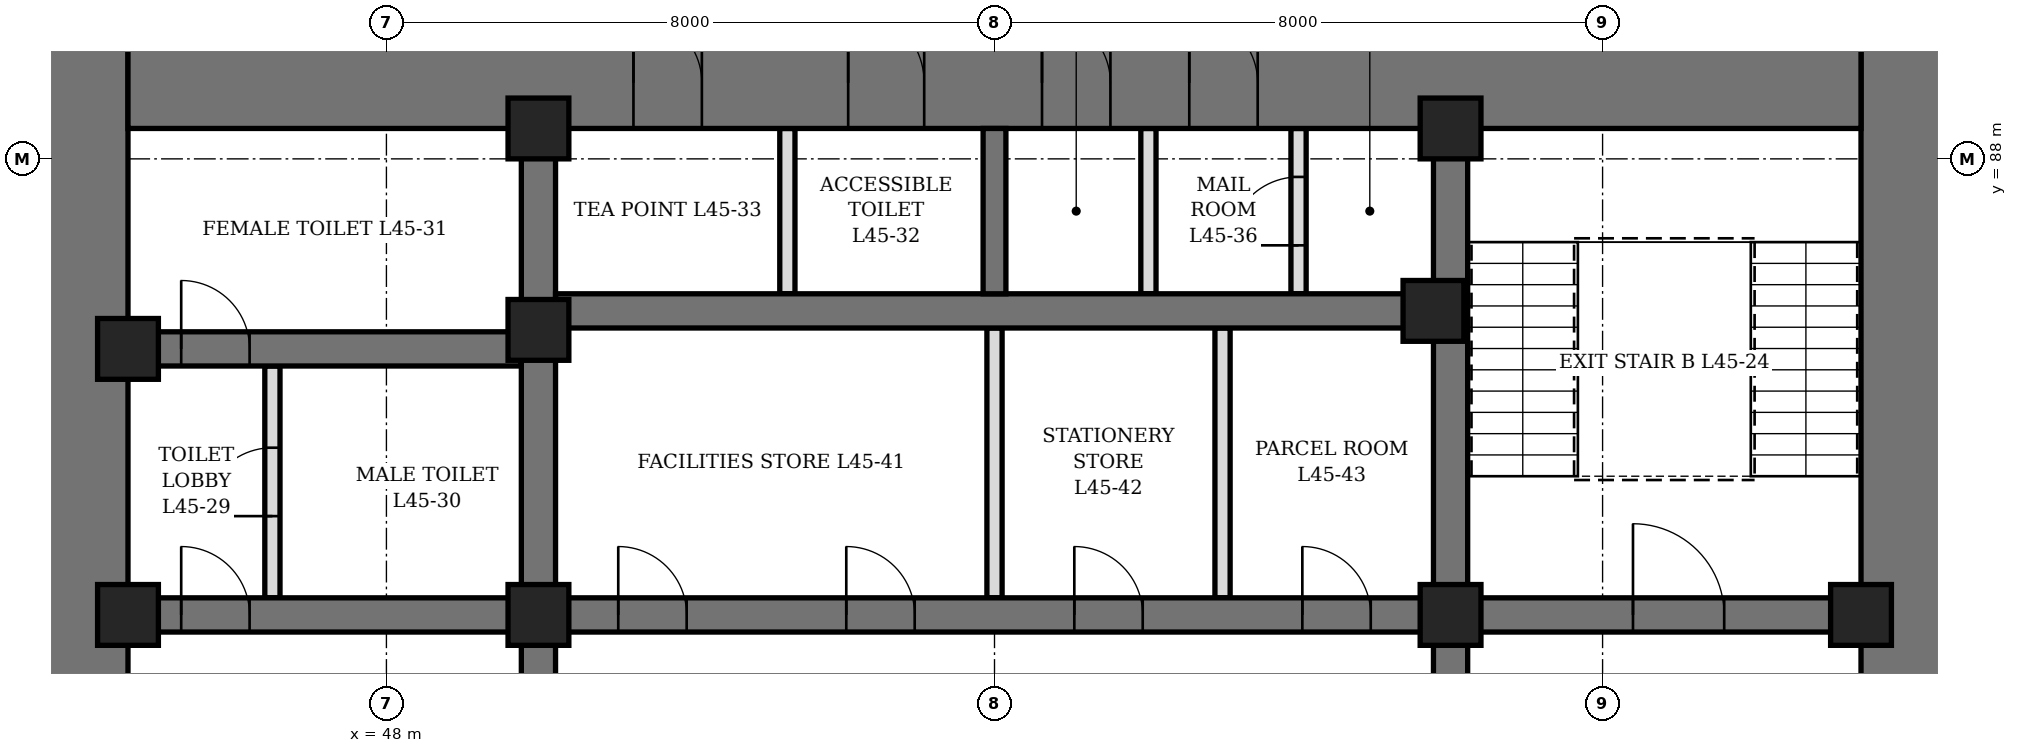
"""IFC4 building model, lengths in metres.
Left out: names, types, materials, properties, quantities, classifications, styles, units other than length and angle.
Written with IfcOpenShell. Run it as: python <this file> out.ifc"""

import sys

from ifc_helpers import new_model, si_unit, direction, frame, frame_2d, origin, origin_2d, place, context, subcontext, project, spatial, rectangle, hollow_rectangle, extrude, element, fill, save


model = new_model("IFC4")
c1 = context("Model", 3, precision=1e-05, world=origin(), true_north=direction((0.0, 1.0)))
c2 = subcontext(c1, "Body", "Model", "MODEL_VIEW")
j1 = project(units=[si_unit("LENGTHUNIT", "METRE"), si_unit("PLANEANGLEUNIT", "RADIAN")], contexts=[c1])
p1 = place(None, origin())
s1 = spatial("IfcSite", under=j1, at=p1, CompositionType="ELEMENT")
p2 = place(p1, origin())
s2 = spatial("IfcBuilding", under=s1, at=p2, CompositionType="ELEMENT")
p3 = place(p2, frame((0.0, 0.0, 202.3)))
s3 = spatial("IfcBuildingStorey", under=s2, at=p3, CompositionType="ELEMENT", Elevation=202.3)
p4 = place(p3, frame((44.0, 70.4, 0.0), z_axis=(0.0, 0.0, 1.0), x_axis=(0.0, 1.0, 0.0)))
e1 = element("IfcWall", 1, at=p4, inside=s3, PredefinedType="SHEAR", context=c2, shape_type="SweptSolid", body=[
    extrude(rectangle(XDim=19.2, YDim=1.2, at=frame_2d((9.6, 0.0))), origin(), (0.0, 0.0, 1.0), 4.2),
])
p5 = place(p4, frame((8.6, 0.0, 0.0)))
e2 = element("IfcOpeningElement", 2, at=p5, cuts=e1, PredefinedType="OPENING", context=c2, shape_type="SweptSolid", body=[
    extrude(rectangle(XDim=2.0, YDim=2.4, at=frame_2d((1.0, 1.2))), frame((0.0, 0.61, 0.0), z_axis=(0.0, -1.0, 0.0), x_axis=(1.0, 0.0, 0.0)), (0.0, 0.0, 1.0), 1.22),
])
p6 = place(p3, frame((68.0, 70.4, 0.0), z_axis=(0.0, 0.0, 1.0), x_axis=(0.0, 1.0, 0.0)))
e3 = element("IfcWall", 3, at=p6, inside=s3, PredefinedType="SHEAR", context=c2, shape_type="SweptSolid", body=[
    extrude(rectangle(XDim=19.2, YDim=1.2, at=frame_2d((9.6, 0.0))), origin(), (0.0, 0.0, 1.0), 4.2),
])
p7 = place(p6, frame((8.6, 0.0, 0.0)))
e4 = element("IfcOpeningElement", 4, at=p7, cuts=e3, PredefinedType="OPENING", context=c2, shape_type="SweptSolid", body=[
    extrude(rectangle(XDim=2.0, YDim=2.4, at=frame_2d((1.0, 1.2))), frame((0.0, 0.61, 0.0), z_axis=(0.0, -1.0, 0.0), x_axis=(1.0, 0.0, 0.0)), (0.0, 0.0, 1.0), 1.22),
])
p8 = place(p3, frame((44.6, 89.0, 0.0), z_axis=(0.0, 0.0, 1.0), x_axis=(1.0, 0.0, 0.0)))
e5 = element("IfcWall", 5, at=p8, inside=s3, PredefinedType="SHEAR", context=c2, shape_type="SweptSolid", body=[
    extrude(rectangle(XDim=22.8, YDim=1.2, at=frame_2d((11.4, 0.0))), origin(), (0.0, 0.0, 1.0), 4.2),
])
p9 = place(p8, frame((9.475, 0.0, 0.0)))
e6 = element("IfcOpeningElement", 6, at=p9, cuts=e5, PredefinedType="OPENING", context=c2, shape_type="SweptSolid", body=[
    extrude(rectangle(XDim=1.0, YDim=2.1, at=frame_2d((0.5, 1.05))), frame((0.0, 0.61, 0.0), z_axis=(0.0, -1.0, 0.0), x_axis=(1.0, 0.0, 0.0)), (0.0, 0.0, 1.0), 1.22),
])
p10 = place(p8, frame((6.65, 0.0, 0.0)))
e7 = element("IfcOpeningElement", 7, at=p10, cuts=e5, PredefinedType="OPENING", context=c2, shape_type="SweptSolid", body=[
    extrude(rectangle(XDim=0.9, YDim=2.1, at=frame_2d((0.45, 1.05))), frame((0.0, 0.61, 0.0), z_axis=(0.0, -1.0, 0.0), x_axis=(1.0, 0.0, 0.0)), (0.0, 0.0, 1.0), 1.22),
])
p11 = place(p8, frame((12.025, 0.0, 0.0)))
e8 = element("IfcOpeningElement", 8, at=p11, cuts=e5, PredefinedType="OPENING", context=c2, shape_type="SweptSolid", body=[
    extrude(rectangle(XDim=0.9, YDim=2.1, at=frame_2d((0.45, 1.05))), frame((0.0, 0.61, 0.0), z_axis=(0.0, -1.0, 0.0), x_axis=(1.0, 0.0, 0.0)), (0.0, 0.0, 1.0), 1.22),
])
p12 = place(p8, frame((13.962, 0.0, 0.0)))
e9 = element("IfcOpeningElement", 9, at=p12, cuts=e5, PredefinedType="OPENING", context=c2, shape_type="SweptSolid", body=[
    extrude(rectangle(XDim=0.9, YDim=2.1, at=frame_2d((0.45, 1.05))), frame((0.0, 0.61, 0.0), z_axis=(0.0, -1.0, 0.0), x_axis=(1.0, 0.0, 0.0)), (0.0, 0.0, 1.0), 1.22),
])
p13 = place(p3, frame((50.0, 71.6, 0.0), z_axis=(0.0, 0.0, 1.0), x_axis=(0.0, 1.0, 0.0)))
e10 = element("IfcWall", 10, at=p13, inside=s3, PredefinedType="SHEAR", context=c2, shape_type="SweptSolid", body=[
    extrude(rectangle(XDim=16.8, YDim=0.45, at=frame_2d((8.4, 0.0))), origin(), (0.0, 0.0, 1.0), 4.2),
])
p14 = place(p13, frame((7.5, 0.0, 0.0)))
e11 = element("IfcOpeningElement", 11, at=p14, cuts=e10, PredefinedType="OPENING", context=c2, shape_type="SweptSolid", body=[
    extrude(rectangle(XDim=1.8, YDim=2.4, at=frame_2d((0.9, 1.2))), frame((0.0, 0.235, 0.0), z_axis=(0.0, -1.0, 0.0), x_axis=(1.0, 0.0, 0.0)), (0.0, 0.0, 1.0), 0.47),
])
p15 = place(p3, frame((62.0, 71.6, 0.0), z_axis=(0.0, 0.0, 1.0), x_axis=(0.0, 1.0, 0.0)))
e12 = element("IfcWall", 12, at=p15, inside=s3, PredefinedType="SHEAR", context=c2, shape_type="SweptSolid", body=[
    extrude(rectangle(XDim=16.8, YDim=0.45, at=frame_2d((8.4, 0.0))), origin(), (0.0, 0.0, 1.0), 4.2),
])
p16 = place(p15, frame((7.5, 0.0, 0.0)))
e13 = element("IfcOpeningElement", 13, at=p16, cuts=e12, PredefinedType="OPENING", context=c2, shape_type="SweptSolid", body=[
    extrude(rectangle(XDim=1.8, YDim=2.4, at=frame_2d((0.9, 1.2))), frame((0.0, 0.235, 0.0), z_axis=(0.0, -1.0, 0.0), x_axis=(1.0, 0.0, 0.0)), (0.0, 0.0, 1.0), 0.47),
])
p17 = place(p3, frame((44.6, 82.0, 0.0), z_axis=(0.0, 0.0, 1.0), x_axis=(1.0, 0.0, 0.0)))
e14 = element("IfcWall", 14, at=p17, inside=s3, PredefinedType="SHEAR", context=c2, shape_type="SweptSolid", body=[
    extrude(rectangle(XDim=5.175, YDim=0.45, at=frame_2d((2.587, 0.0))), origin(), (0.0, 0.0, 1.0), 4.2),
])
p18 = place(p17, frame((0.7, 0.0, 0.0)))
e15 = element("IfcOpeningElement", 15, at=p18, cuts=e14, PredefinedType="OPENING", context=c2, shape_type="SweptSolid", body=[
    extrude(rectangle(XDim=0.9, YDim=2.1, at=frame_2d((0.45, 1.05))), frame((0.0, 0.235, 0.0), z_axis=(0.0, -1.0, 0.0), x_axis=(1.0, 0.0, 0.0)), (0.0, 0.0, 1.0), 0.47),
])
p19 = place(p3, frame((44.6, 85.5, 0.0), z_axis=(0.0, 0.0, 1.0), x_axis=(1.0, 0.0, 0.0)))
e16 = element("IfcWall", 16, at=p19, inside=s3, PredefinedType="SHEAR", context=c2, shape_type="SweptSolid", body=[
    extrude(rectangle(XDim=5.175, YDim=0.45, at=frame_2d((2.587, 0.0))), origin(), (0.0, 0.0, 1.0), 4.2),
])
p20 = place(p19, frame((0.7, 0.0, 0.0)))
e17 = element("IfcOpeningElement", 17, at=p20, cuts=e16, PredefinedType="OPENING", context=c2, shape_type="SweptSolid", body=[
    extrude(rectangle(XDim=0.9, YDim=2.1, at=frame_2d((0.45, 1.05))), frame((0.0, 0.235, 0.0), z_axis=(0.0, -1.0, 0.0), x_axis=(1.0, 0.0, 0.0)), (0.0, 0.0, 1.0), 0.47),
])
p21 = place(p3, frame((62.225, 82.0, 0.0), z_axis=(0.0, 0.0, 1.0), x_axis=(1.0, 0.0, 0.0)))
e18 = element("IfcWall", 18, at=p21, inside=s3, PredefinedType="SHEAR", context=c2, shape_type="SweptSolid", body=[
    extrude(rectangle(XDim=5.175, YDim=0.45, at=frame_2d((2.587, 0.0))), origin(), (0.0, 0.0, 1.0), 4.2),
])
p22 = place(p21, frame((2.175, 0.0, 0.0)))
e19 = element("IfcOpeningElement", 19, at=p22, cuts=e18, PredefinedType="OPENING", context=c2, shape_type="SweptSolid", body=[
    extrude(rectangle(XDim=1.2, YDim=2.1, at=frame_2d((0.6, 1.05))), frame((0.0, 0.235, 0.0), z_axis=(0.0, -1.0, 0.0), x_axis=(1.0, 0.0, 0.0)), (0.0, 0.0, 1.0), 0.47),
])
p23 = place(p3, frame((50.225, 82.0, 0.0), z_axis=(0.0, 0.0, 1.0), x_axis=(1.0, 0.0, 0.0)))
e20 = element("IfcWall", 20, at=p23, inside=s3, PredefinedType="SHEAR", context=c2, shape_type="SweptSolid", body=[
    extrude(rectangle(XDim=11.55, YDim=0.45, at=frame_2d((5.775, 0.0))), origin(), (0.0, 0.0, 1.0), 4.2),
])
p24 = place(p23, frame((0.825, 0.0, 0.0)))
e21 = element("IfcOpeningElement", 21, at=p24, cuts=e20, PredefinedType="OPENING", context=c2, shape_type="SweptSolid", body=[
    extrude(rectangle(XDim=0.9, YDim=2.1, at=frame_2d((0.45, 1.05))), frame((0.0, 0.235, 0.0), z_axis=(0.0, -1.0, 0.0), x_axis=(1.0, 0.0, 0.0)), (0.0, 0.0, 1.0), 0.47),
])
p25 = place(p23, frame((3.825, 0.0, 0.0)))
e22 = element("IfcOpeningElement", 22, at=p25, cuts=e20, PredefinedType="OPENING", context=c2, shape_type="SweptSolid", body=[
    extrude(rectangle(XDim=0.9, YDim=2.1, at=frame_2d((0.45, 1.05))), frame((0.0, 0.235, 0.0), z_axis=(0.0, -1.0, 0.0), x_axis=(1.0, 0.0, 0.0)), (0.0, 0.0, 1.0), 0.47),
])
p26 = place(p23, frame((6.825, 0.0, 0.0)))
e23 = element("IfcOpeningElement", 23, at=p26, cuts=e20, PredefinedType="OPENING", context=c2, shape_type="SweptSolid", body=[
    extrude(rectangle(XDim=0.9, YDim=2.1, at=frame_2d((0.45, 1.05))), frame((0.0, 0.235, 0.0), z_axis=(0.0, -1.0, 0.0), x_axis=(1.0, 0.0, 0.0)), (0.0, 0.0, 1.0), 0.47),
])
p27 = place(p23, frame((9.825, 0.0, 0.0)))
e24 = element("IfcOpeningElement", 24, at=p27, cuts=e20, PredefinedType="OPENING", context=c2, shape_type="SweptSolid", body=[
    extrude(rectangle(XDim=0.9, YDim=2.1, at=frame_2d((0.45, 1.05))), frame((0.0, 0.235, 0.0), z_axis=(0.0, -1.0, 0.0), x_axis=(1.0, 0.0, 0.0)), (0.0, 0.0, 1.0), 0.47),
])
p28 = place(p3, frame((50.225, 86.0, 0.0), z_axis=(0.0, 0.0, 1.0), x_axis=(1.0, 0.0, 0.0)))
e25 = element("IfcWall", 25, at=p28, inside=s3, PredefinedType="SHEAR", context=c2, shape_type="SweptSolid", body=[
    extrude(rectangle(XDim=11.55, YDim=0.45, at=frame_2d((5.775, 0.0))), origin(), (0.0, 0.0, 1.0), 4.2),
])
p29 = place(p3, frame((56.0, 86.225, 0.0), z_axis=(0.0, 0.0, 1.0), x_axis=(0.0, 1.0, 0.0)))
e26 = element("IfcWall", 26, at=p29, inside=s3, PredefinedType="SHEAR", context=c2, shape_type="SweptSolid", body=[
    extrude(rectangle(XDim=2.175, YDim=0.3, at=frame_2d((1.087, 0.0))), origin(), (0.0, 0.0, 1.0), 4.2),
])
for number, where, z_axis, x_axis in (
    (27, (44.6, 82.0, 0.0), (0.0, 0.0, 1.0), (1.0, 0.0, 0.0)),
    (28, (44.6, 85.5, 0.0), (0.0, 0.0, 1.0), (1.0, 0.0, 0.0)),
    (29, (50.0, 82.0, 0.0), (0.0, 0.0, 1.0), (1.0, 0.0, 0.0)),
    (30, (50.0, 85.75, 0.0), (0.0, 0.0, 1.0), (1.0, 0.0, 0.0)),
    (31, (50.0, 88.4, 0.0), (0.0, 0.0, 1.0), (1.0, 0.0, 0.0)),
    (32, (61.775, 86.0, 0.0), (0.0, 0.0, 1.0), (1.0, 0.0, 0.0)),
    (33, (62.0, 82.0, 0.0), (0.0, 0.0, 1.0), (1.0, 0.0, 0.0)),
    (34, (62.0, 88.4, 0.0), (0.0, 0.0, 1.0), (1.0, 0.0, 0.0)),
    (35, (67.4, 82.0, 0.0), (0.0, 0.0, 1.0), (1.0, 0.0, 0.0)),
):
    element("IfcColumn", number, at=place(p3, frame(where, z_axis=z_axis, x_axis=x_axis)), inside=s3, PredefinedType="COLUMN", context=c2, shape_type="SweptSolid", body=[
        extrude(hollow_rectangle(XDim=0.8, YDim=0.8, WallThickness=0.1, at=origin_2d()), origin(), (0.0, 0.0, 1.0), 4.2),
    ])
p30 = place(p3, frame((46.5, 82.225, 0.0), z_axis=(0.0, 0.0, 1.0), x_axis=(0.0, 1.0, 0.0)))
e36 = element("IfcWall", 36, at=p30, inside=s3, PredefinedType="PARTITIONING", context=c2, shape_type="SweptSolid", body=[
    extrude(rectangle(XDim=3.05, YDim=0.2, at=frame_2d((1.525, 0.0))), origin(), (0.0, 0.0, 1.0), 4.04),
])
p31 = place(p30, frame((1.075, 0.0, 0.0)))
e37 = element("IfcOpeningElement", 37, at=p31, cuts=e36, PredefinedType="OPENING", context=c2, shape_type="SweptSolid", body=[
    extrude(rectangle(XDim=0.9, YDim=2.1, at=frame_2d((0.45, 1.05))), frame((0.0, 0.11, 0.0), z_axis=(0.0, -1.0, 0.0), x_axis=(1.0, 0.0, 0.0)), (0.0, 0.0, 1.0), 0.22),
])
p32 = place(p3, frame((53.275, 86.225, 0.0), z_axis=(0.0, 0.0, 1.0), x_axis=(0.0, 1.0, 0.0)))
e38 = element("IfcWall", 38, at=p32, inside=s3, PredefinedType="PARTITIONING", context=c2, shape_type="SweptSolid", body=[
    extrude(rectangle(XDim=2.175, YDim=0.2, at=frame_2d((1.087, 0.0))), origin(), (0.0, 0.0, 1.0), 4.04),
])
p33 = place(p3, frame((60.0, 86.225, 0.0), z_axis=(0.0, 0.0, 1.0), x_axis=(0.0, 1.0, 0.0)))
e39 = element("IfcWall", 39, at=p33, inside=s3, PredefinedType="PARTITIONING", context=c2, shape_type="SweptSolid", body=[
    extrude(rectangle(XDim=2.175, YDim=0.2, at=frame_2d((1.087, 0.0))), origin(), (0.0, 0.0, 1.0), 4.04),
])
p34 = place(p33, frame((0.637, 0.0, 0.0)))
e40 = element("IfcOpeningElement", 40, at=p34, cuts=e39, PredefinedType="OPENING", context=c2, shape_type="SweptSolid", body=[
    extrude(rectangle(XDim=0.9, YDim=2.1, at=frame_2d((0.45, 1.05))), frame((0.0, 0.11, 0.0), z_axis=(0.0, -1.0, 0.0), x_axis=(1.0, 0.0, 0.0)), (0.0, 0.0, 1.0), 0.22),
])
p35 = place(p3, frame((58.025, 86.225, 0.0), z_axis=(0.0, 0.0, 1.0), x_axis=(0.0, 1.0, 0.0)))
e41 = element("IfcWall", 41, at=p35, inside=s3, PredefinedType="PARTITIONING", context=c2, shape_type="SweptSolid", body=[
    extrude(rectangle(XDim=2.175, YDim=0.2, at=frame_2d((1.087, 0.0))), origin(), (0.0, 0.0, 1.0), 4.04),
])
p36 = place(p3, frame((56.0, 82.225, 0.0), z_axis=(0.0, 0.0, 1.0), x_axis=(0.0, 1.0, 0.0)))
e42 = element("IfcWall", 42, at=p36, inside=s3, PredefinedType="PARTITIONING", context=c2, shape_type="SweptSolid", body=[
    extrude(rectangle(XDim=3.55, YDim=0.2, at=frame_2d((1.775, 0.0))), origin(), (0.0, 0.0, 1.0), 3.14),
])
p37 = place(p3, frame((59.0, 82.225, 0.0), z_axis=(0.0, 0.0, 1.0), x_axis=(0.0, 1.0, 0.0)))
e43 = element("IfcWall", 43, at=p37, inside=s3, PredefinedType="PARTITIONING", context=c2, shape_type="SweptSolid", body=[
    extrude(rectangle(XDim=3.55, YDim=0.2, at=frame_2d((1.775, 0.0))), origin(), (0.0, 0.0, 1.0), 4.04),
])
p38 = place(p18, origin())
e44 = element("IfcDoor", 44, at=p38, inside=s3, OperationType="SINGLE_SWING_LEFT", PredefinedType="DOOR", context=c2, shape_type="SweptSolid", body=[
    extrude(rectangle(XDim=0.9, YDim=2.1, at=frame_2d((0.45, 1.05))), frame((0.0, 0.225, 0.0), z_axis=(0.0, -1.0, 0.0), x_axis=(1.0, 0.0, 0.0)), (0.0, 0.0, 1.0), 0.449),
])
fill(e15, e44)
p39 = place(p31, origin())
e45 = element("IfcDoor", 45, at=p39, inside=s3, OperationType="SINGLE_SWING_RIGHT", PredefinedType="DOOR", context=c2, shape_type="SweptSolid", body=[
    extrude(rectangle(XDim=0.9, YDim=2.1, at=frame_2d((0.45, 1.05))), frame((0.0, 0.1, 0.0), z_axis=(0.0, -1.0, 0.0), x_axis=(1.0, 0.0, 0.0)), (0.0, 0.0, 1.0), 0.199),
])
fill(e37, e45)
p40 = place(p20, origin())
e46 = element("IfcDoor", 46, at=p40, inside=s3, OperationType="SINGLE_SWING_RIGHT", PredefinedType="DOOR", context=c2, shape_type="SweptSolid", body=[
    extrude(rectangle(XDim=0.9, YDim=2.1, at=frame_2d((0.45, 1.05))), frame((0.0, 0.225, 0.0), z_axis=(0.0, -1.0, 0.0), x_axis=(1.0, 0.0, 0.0)), (0.0, 0.0, 1.0), 0.449),
])
fill(e17, e46)
p41 = place(p9, origin())
e47 = element("IfcDoor", 47, at=p41, inside=s3, OperationType="SINGLE_SWING_LEFT", PredefinedType="DOOR", context=c2, shape_type="SweptSolid", body=[
    extrude(rectangle(XDim=1.0, YDim=2.1, at=frame_2d((0.5, 1.05))), frame((0.0, 0.35, 0.0), z_axis=(0.0, -1.0, 0.0), x_axis=(1.0, 0.0, 0.0)), (0.0, 0.0, 1.0), 0.7),
])
fill(e6, e47)
p42 = place(p10, origin())
e48 = element("IfcDoor", 48, at=p42, inside=s3, OperationType="SINGLE_SWING_LEFT", PredefinedType="DOOR", context=c2, shape_type="SweptSolid", body=[
    extrude(rectangle(XDim=0.9, YDim=2.1, at=frame_2d((0.45, 1.05))), frame((0.0, 0.35, 0.0), z_axis=(0.0, -1.0, 0.0), x_axis=(1.0, 0.0, 0.0)), (0.0, 0.0, 1.0), 0.7),
])
fill(e7, e48)
p43 = place(p11, origin())
e49 = element("IfcDoor", 49, at=p43, inside=s3, OperationType="SINGLE_SWING_LEFT", PredefinedType="DOOR", context=c2, shape_type="SweptSolid", body=[
    extrude(rectangle(XDim=0.9, YDim=2.1, at=frame_2d((0.45, 1.05))), frame((0.0, 0.35, 0.0), z_axis=(0.0, -1.0, 0.0), x_axis=(1.0, 0.0, 0.0)), (0.0, 0.0, 1.0), 0.7),
])
fill(e8, e49)
p44 = place(p12, origin())
e50 = element("IfcDoor", 50, at=p44, inside=s3, OperationType="SINGLE_SWING_LEFT", PredefinedType="DOOR", context=c2, shape_type="SweptSolid", body=[
    extrude(rectangle(XDim=0.9, YDim=2.1, at=frame_2d((0.45, 1.05))), frame((0.0, 0.35, 0.0), z_axis=(0.0, -1.0, 0.0), x_axis=(1.0, 0.0, 0.0)), (0.0, 0.0, 1.0), 0.7),
])
fill(e9, e50)
p45 = place(p34, origin())
e51 = element("IfcDoor", 51, at=p45, inside=s3, OperationType="SINGLE_SWING_LEFT", PredefinedType="DOOR", context=c2, shape_type="SweptSolid", body=[
    extrude(rectangle(XDim=0.9, YDim=2.1, at=frame_2d((0.45, 1.05))), frame((0.0, 0.1, 0.0), z_axis=(0.0, -1.0, 0.0), x_axis=(1.0, 0.0, 0.0)), (0.0, 0.0, 1.0), 0.199),
])
fill(e40, e51)
p46 = place(p24, origin())
e52 = element("IfcDoor", 52, at=p46, inside=s3, OperationType="SINGLE_SWING_LEFT", PredefinedType="DOOR", context=c2, shape_type="SweptSolid", body=[
    extrude(rectangle(XDim=0.9, YDim=2.1, at=frame_2d((0.45, 1.05))), frame((0.0, 0.225, 0.0), z_axis=(0.0, -1.0, 0.0), x_axis=(1.0, 0.0, 0.0)), (0.0, 0.0, 1.0), 0.449),
])
fill(e21, e52)
p47 = place(p25, origin())
e53 = element("IfcDoor", 53, at=p47, inside=s3, OperationType="SINGLE_SWING_LEFT", PredefinedType="DOOR", context=c2, shape_type="SweptSolid", body=[
    extrude(rectangle(XDim=0.9, YDim=2.1, at=frame_2d((0.45, 1.05))), frame((0.0, 0.225, 0.0), z_axis=(0.0, -1.0, 0.0), x_axis=(1.0, 0.0, 0.0)), (0.0, 0.0, 1.0), 0.449),
])
fill(e22, e53)
p48 = place(p26, origin())
e54 = element("IfcDoor", 54, at=p48, inside=s3, OperationType="SINGLE_SWING_LEFT", PredefinedType="DOOR", context=c2, shape_type="SweptSolid", body=[
    extrude(rectangle(XDim=0.9, YDim=2.1, at=frame_2d((0.45, 1.05))), frame((0.0, 0.225, 0.0), z_axis=(0.0, -1.0, 0.0), x_axis=(1.0, 0.0, 0.0)), (0.0, 0.0, 1.0), 0.449),
])
fill(e23, e54)
p49 = place(p27, origin())
e55 = element("IfcDoor", 55, at=p49, inside=s3, OperationType="SINGLE_SWING_LEFT", PredefinedType="DOOR", context=c2, shape_type="SweptSolid", body=[
    extrude(rectangle(XDim=0.9, YDim=2.1, at=frame_2d((0.45, 1.05))), frame((0.0, 0.225, 0.0), z_axis=(0.0, -1.0, 0.0), x_axis=(1.0, 0.0, 0.0)), (0.0, 0.0, 1.0), 0.449),
])
fill(e24, e55)
p50 = place(p22, origin())
e56 = element("IfcDoor", 56, at=p50, inside=s3, OperationType="SINGLE_SWING_LEFT", PredefinedType="DOOR", context=c2, shape_type="SweptSolid", body=[
    extrude(rectangle(XDim=1.2, YDim=2.1, at=frame_2d((0.6, 1.05))), frame((0.0, 0.225, 0.0), z_axis=(0.0, -1.0, 0.0), x_axis=(1.0, 0.0, 0.0)), (0.0, 0.0, 1.0), 0.449),
])
fill(e19, e56)
save(model, sys.argv[1])
